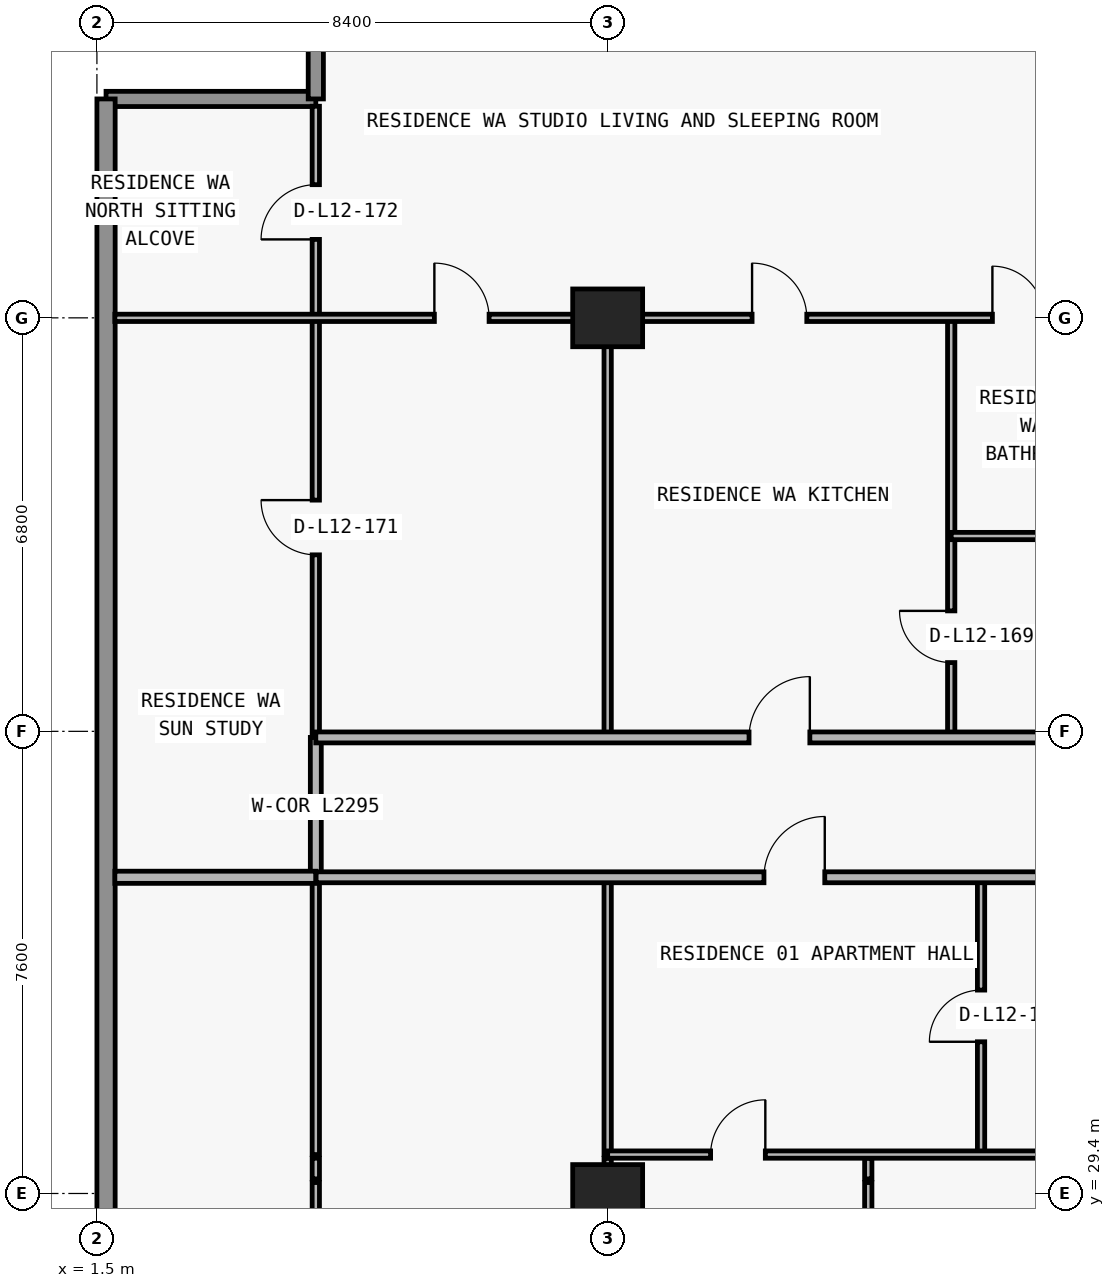
"""IFC4 building model, lengths in metres.
Left out: names, types, materials, properties, quantities, classifications, styles, units other than length and angle.
Written with IfcOpenShell. Run it as: python <this file> out.ifc"""

import sys

from ifc_helpers import new_model, si_unit, direction, frame, frame_2d, origin, origin_2d, place, context, subcontext, project, spatial, rectangle, extrude, element, fill, save


model = new_model("IFC4")
c1 = context("Model", 3, precision=1e-05, world=origin(), true_north=direction((0.0, 1.0)))
c2 = subcontext(c1, "Body", "Model", "MODEL_VIEW")
j1 = project(units=[si_unit("LENGTHUNIT", "METRE"), si_unit("PLANEANGLEUNIT", "RADIAN")], contexts=[c1])
p1 = place(None, origin())
s1 = spatial("IfcSite", under=j1, at=p1, CompositionType="ELEMENT")
p2 = place(p1, origin())
s2 = spatial("IfcBuilding", under=s1, at=p2, CompositionType="ELEMENT")
p3 = place(p2, frame((0.0, 0.0, 49.8)))
s3 = spatial("IfcBuildingStorey", under=s2, at=p3, CompositionType="ELEMENT", Elevation=49.8)
for number, where, z_axis, x_axis in (
    (1, (9.9, 29.4, 0.0), (0.0, 0.0, 1.0), (1.0, 0.0, 0.0)),
    (2, (9.9, 43.8, 0.0), (0.0, 0.0, 1.0), (1.0, 0.0, 0.0)),
):
    element("IfcColumn", number, at=place(p3, frame(where, z_axis=z_axis, x_axis=x_axis)), inside=s3, PredefinedType="COLUMN", context=c2, shape_type="SweptSolid", body=[
        extrude(rectangle(XDim=1.15, YDim=0.95, at=origin_2d()), origin(), (0.0, 0.0, 1.0), 3.05),
    ])
p4 = place(p3, frame((1.65, 47.4, 0.0), z_axis=(0.0, 0.0, 1.0), x_axis=(1.0, 0.0, 0.0)))
e3 = element("IfcWall", 3, at=p4, inside=s3, PredefinedType="ELEMENTEDWALL", context=c2, shape_type="SweptSolid", body=[
    extrude(rectangle(XDim=3.45, YDim=0.25, at=frame_2d((1.725, 0.0))), origin(), (0.0, 0.0, 1.0), 3.05),
])
p5 = place(p3, frame((5.1, 47.4, 0.0), z_axis=(0.0, 0.0, 1.0), x_axis=(0.0, 1.0, 0.0)))
e4 = element("IfcWall", 4, at=p5, inside=s3, PredefinedType="ELEMENTEDWALL", context=c2, shape_type="SweptSolid", body=[
    extrude(rectangle(XDim=3.05, YDim=0.25, at=frame_2d((1.525, 0.0))), origin(), (0.0, 0.0, 1.0), 3.05),
])
p6 = place(p3, frame((1.65, 26.8, 0.0), z_axis=(0.0, 0.0, 1.0), x_axis=(0.0, 1.0, 0.0)))
e5 = element("IfcWall", 5, at=p6, inside=s3, PredefinedType="STANDARD", context=c2, shape_type="SweptSolid", body=[
    extrude(rectangle(XDim=20.6, YDim=0.3, at=frame_2d((10.3, 0.0))), origin(), (0.0, 0.0, 1.0), 3.05),
])
p7 = place(p3, frame((5.1, 24.89, 0.0), z_axis=(0.0, 0.0, 1.0), x_axis=(0.0, 1.0, 0.0)))
e6 = element("IfcWall", 6, at=p7, inside=s3, PredefinedType="PARTITIONING", context=c2, shape_type="SweptSolid", body=[
    extrude(rectangle(XDim=4.69, YDim=0.12, at=frame_2d((2.345, 0.0))), origin(), (0.0, 0.0, 1.0), 3.05),
])
p8 = place(p3, frame((5.1, 29.64, 0.0), z_axis=(0.0, 0.0, 1.0), x_axis=(0.0, 1.0, 0.0)))
e7 = element("IfcWall", 7, at=p8, inside=s3, PredefinedType="PARTITIONING", context=c2, shape_type="SweptSolid", body=[
    extrude(rectangle(XDim=0.34, YDim=0.12, at=frame_2d((0.17, 0.0))), origin(), (0.0, 0.0, 1.0), 3.05),
])
p9 = place(p3, frame((5.1, 30.04, 0.0), z_axis=(0.0, 0.0, 1.0), x_axis=(0.0, 1.0, 0.0)))
e8 = element("IfcWall", 8, at=p9, inside=s3, PredefinedType="PARTITIONING", context=c2, shape_type="SweptSolid", body=[
    extrude(rectangle(XDim=4.56, YDim=0.12, at=frame_2d((2.28, 0.0))), origin(), (0.0, 0.0, 1.0), 3.05),
])
p10 = place(p3, frame((5.1, 34.605, 0.0), z_axis=(0.0, 0.0, 1.0), x_axis=(0.0, 1.0, 0.0)))
e9 = element("IfcWall", 9, at=p10, inside=s3, PredefinedType="PARTITIONING", context=c2, shape_type="SweptSolid", body=[
    extrude(rectangle(XDim=2.295, YDim=0.18, at=frame_2d((1.147, 0.0))), origin(), (0.0, 0.0, 1.0), 3.05),
])
p11 = place(p3, frame((5.1, 36.905, 0.0), z_axis=(0.0, 0.0, 1.0), x_axis=(0.0, 1.0, 0.0)))
e10 = element("IfcWall", 10, at=p11, inside=s3, PredefinedType="PARTITIONING", context=c2, shape_type="SweptSolid", body=[
    extrude(rectangle(XDim=10.375, YDim=0.12, at=frame_2d((5.188, 0.0))), origin(), (0.0, 0.0, 1.0), 3.05),
])
p12 = place(p11, frame((2.998, 0.0, 0.0)))
e11 = element("IfcOpeningElement", 11, at=p12, cuts=e10, PredefinedType="OPENING", context=c2, shape_type="SweptSolid", body=[
    extrude(rectangle(XDim=0.9, YDim=2.15, at=frame_2d((0.45, 1.075))), frame((0.0, 0.07, 0.0), z_axis=(0.0, -1.0, 0.0), x_axis=(1.0, 0.0, 0.0)), (0.0, 0.0, 1.0), 0.14),
])
p13 = place(p11, frame((8.185, 0.0, 0.0)))
e12 = element("IfcOpeningElement", 12, at=p13, cuts=e10, PredefinedType="OPENING", context=c2, shape_type="SweptSolid", body=[
    extrude(rectangle(XDim=0.9, YDim=2.15, at=frame_2d((0.45, 1.075))), frame((0.0, 0.07, 0.0), z_axis=(0.0, -1.0, 0.0), x_axis=(1.0, 0.0, 0.0)), (0.0, 0.0, 1.0), 0.14),
])
p14 = place(p3, frame((9.9, 24.89, 0.0), z_axis=(0.0, 0.0, 1.0), x_axis=(0.0, 1.0, 0.0)))
e13 = element("IfcWall", 13, at=p14, inside=s3, PredefinedType="PARTITIONING", context=c2, shape_type="SweptSolid", body=[
    extrude(rectangle(XDim=4.69, YDim=0.12, at=frame_2d((2.345, 0.0))), origin(), (0.0, 0.0, 1.0), 2.11),
])
p15 = place(p14, frame((1.895, 0.0, 0.0)))
e14 = element("IfcOpeningElement", 14, at=p15, cuts=e13, PredefinedType="OPENING", context=c2, shape_type="SweptSolid", body=[
    extrude(rectangle(XDim=0.9, YDim=2.06, at=frame_2d((0.45, 1.03))), frame((0.0, 0.07, 0.0), z_axis=(0.0, -1.0, 0.0), x_axis=(1.0, 0.0, 0.0)), (0.0, 0.0, 1.0), 0.14),
])
p16 = place(p3, frame((9.9, 29.64, 0.0), z_axis=(0.0, 0.0, 1.0), x_axis=(0.0, 1.0, 0.0)))
e15 = element("IfcWall", 15, at=p16, inside=s3, PredefinedType="PARTITIONING", context=c2, shape_type="SweptSolid", body=[
    extrude(rectangle(XDim=0.34, YDim=0.12, at=frame_2d((0.17, 0.0))), origin(), (0.0, 0.0, 1.0), 2.11),
])
p17 = place(p3, frame((9.9, 30.04, 0.0), z_axis=(0.0, 0.0, 1.0), x_axis=(0.0, 1.0, 0.0)))
e16 = element("IfcWall", 16, at=p17, inside=s3, PredefinedType="PARTITIONING", context=c2, shape_type="SweptSolid", body=[
    extrude(rectangle(XDim=4.56, YDim=0.12, at=frame_2d((2.28, 0.0))), origin(), (0.0, 0.0, 1.0), 2.11),
])
p18 = place(p3, frame((9.9, 36.9, 0.0), z_axis=(0.0, 0.0, 1.0), x_axis=(0.0, 1.0, 0.0)))
e17 = element("IfcWall", 17, at=p18, inside=s3, PredefinedType="PARTITIONING", context=c2, shape_type="SweptSolid", body=[
    extrude(rectangle(XDim=6.9, YDim=0.12, at=frame_2d((3.45, 0.0))), origin(), (0.0, 0.0, 1.0), 2.11),
])
p19 = place(p3, frame((14.186, 24.89, 0.0), z_axis=(0.0, 0.0, 1.0), x_axis=(0.0, 1.0, 0.0)))
e18 = element("IfcWall", 18, at=p19, inside=s3, PredefinedType="PARTITIONING", context=c2, shape_type="SweptSolid", body=[
    extrude(rectangle(XDim=4.69, YDim=0.12, at=frame_2d((2.345, 0.0))), origin(), (0.0, 0.0, 1.0), 3.05),
])
p20 = place(p19, frame((1.895, 0.0, 0.0)))
e19 = element("IfcOpeningElement", 19, at=p20, cuts=e18, PredefinedType="OPENING", context=c2, shape_type="SweptSolid", body=[
    extrude(rectangle(XDim=0.9, YDim=2.15, at=frame_2d((0.45, 1.075))), frame((0.0, 0.07, 0.0), z_axis=(0.0, -1.0, 0.0), x_axis=(1.0, 0.0, 0.0)), (0.0, 0.0, 1.0), 0.14),
])
p21 = place(p3, frame((14.186, 29.64, 0.0), z_axis=(0.0, 0.0, 1.0), x_axis=(0.0, 1.0, 0.0)))
e20 = element("IfcWall", 20, at=p21, inside=s3, PredefinedType="PARTITIONING", context=c2, shape_type="SweptSolid", body=[
    extrude(rectangle(XDim=0.34, YDim=0.12, at=frame_2d((0.17, 0.0))), origin(), (0.0, 0.0, 1.0), 3.05),
])
p22 = place(p3, frame((15.55, 36.9, 0.0), z_axis=(0.0, 0.0, 1.0), x_axis=(0.0, 1.0, 0.0)))
e21 = element("IfcWall", 21, at=p22, inside=s3, PredefinedType="PARTITIONING", context=c2, shape_type="SweptSolid", body=[
    extrude(rectangle(XDim=6.9, YDim=0.12, at=frame_2d((3.45, 0.0))), origin(), (0.0, 0.0, 1.0), 2.499),
])
p23 = place(p22, frame((1.231, 0.0, 0.0)))
e22 = element("IfcOpeningElement", 22, at=p23, cuts=e21, PredefinedType="OPENING", context=c2, shape_type="SweptSolid", body=[
    extrude(rectangle(XDim=0.85, YDim=2.1, at=frame_2d((0.425, 1.05))), frame((0.0, 0.07, 0.0), z_axis=(0.0, -1.0, 0.0), x_axis=(1.0, 0.0, 0.0)), (0.0, 0.0, 1.0), 0.14),
])
p24 = place(p3, frame((16.041, 30.04, 0.0), z_axis=(0.0, 0.0, 1.0), x_axis=(0.0, 1.0, 0.0)))
e23 = element("IfcWall", 23, at=p24, inside=s3, PredefinedType="PARTITIONING", context=c2, shape_type="SweptSolid", body=[
    extrude(rectangle(XDim=4.56, YDim=0.12, at=frame_2d((2.28, 0.0))), origin(), (0.0, 0.0, 1.0), 3.05),
])
p25 = place(p24, frame((1.855, 0.0, 0.0)))
e24 = element("IfcOpeningElement", 24, at=p25, cuts=e23, PredefinedType="OPENING", context=c2, shape_type="SweptSolid", body=[
    extrude(rectangle(XDim=0.85, YDim=2.1, at=frame_2d((0.425, 1.05))), frame((0.0, 0.07, 0.0), z_axis=(0.0, -1.0, 0.0), x_axis=(1.0, 0.0, 0.0)), (0.0, 0.0, 1.0), 0.14),
])
p26 = place(p3, frame((9.9, 30.04, 0.0), z_axis=(0.0, 0.0, 1.0), x_axis=(1.0, 0.0, 0.0)))
e25 = element("IfcWall", 25, at=p26, inside=s3, PredefinedType="PARTITIONING", context=c2, shape_type="SweptSolid", body=[
    extrude(rectangle(XDim=8.4, YDim=0.12, at=frame_2d((4.2, 0.0))), origin(), (0.0, 0.0, 1.0), 3.05),
])
p27 = place(p26, frame((1.693, 0.0, 0.0)))
e26 = element("IfcOpeningElement", 26, at=p27, cuts=e25, PredefinedType="OPENING", context=c2, shape_type="SweptSolid", body=[
    extrude(rectangle(XDim=0.9, YDim=2.15, at=frame_2d((0.45, 1.075))), frame((0.0, 0.07, 0.0), z_axis=(0.0, -1.0, 0.0), x_axis=(1.0, 0.0, 0.0)), (0.0, 0.0, 1.0), 0.14),
])
p28 = place(p3, frame((1.795, 34.6, 0.0), z_axis=(0.0, 0.0, 1.0), x_axis=(1.0, 0.0, 0.0)))
e27 = element("IfcWall", 27, at=p28, inside=s3, PredefinedType="PARTITIONING", context=c2, shape_type="SweptSolid", body=[
    extrude(rectangle(XDim=3.305, YDim=0.2, at=frame_2d((1.653, 0.0))), origin(), (0.0, 0.0, 1.0), 3.05),
])
p29 = place(p3, frame((5.105, 34.6, 0.0), z_axis=(0.0, 0.0, 1.0), x_axis=(1.0, 0.0, 0.0)))
e28 = element("IfcWall", 28, at=p29, inside=s3, PredefinedType="PARTITIONING", context=c2, shape_type="SweptSolid", body=[
    extrude(rectangle(XDim=67.595, YDim=0.18, at=frame_2d((33.797, 0.0))), origin(), (0.0, 0.0, 1.0), 3.05),
])
p30 = place(p29, frame((7.365, 0.0, 0.0)))
e29 = element("IfcOpeningElement", 29, at=p30, cuts=e28, PredefinedType="OPENING", context=c2, shape_type="SweptSolid", body=[
    extrude(rectangle(XDim=1.0, YDim=2.2, at=frame_2d((0.5, 1.1))), frame((0.0, 0.1, 0.0), z_axis=(0.0, -1.0, 0.0), x_axis=(1.0, 0.0, 0.0)), (0.0, 0.0, 1.0), 0.2),
])
p31 = place(p29, frame((15.927, 0.0, 0.0)))
e30 = element("IfcOpeningElement", 30, at=p31, cuts=e28, PredefinedType="OPENING", context=c2, shape_type="SweptSolid", body=[
    extrude(rectangle(XDim=1.0, YDim=2.2, at=frame_2d((0.5, 1.1))), frame((0.0, 0.1, 0.0), z_axis=(0.0, -1.0, 0.0), x_axis=(1.0, 0.0, 0.0)), (0.0, 0.0, 1.0), 0.2),
])
p32 = place(p29, frame((24.407, 0.0, 0.0)))
e31 = element("IfcOpeningElement", 31, at=p32, cuts=e28, PredefinedType="OPENING", context=c2, shape_type="SweptSolid", body=[
    extrude(rectangle(XDim=1.0, YDim=2.2, at=frame_2d((0.5, 1.1))), frame((0.0, 0.1, 0.0), z_axis=(0.0, -1.0, 0.0), x_axis=(1.0, 0.0, 0.0)), (0.0, 0.0, 1.0), 0.2),
])
p33 = place(p29, frame((48.739, 0.0, 0.0)))
e32 = element("IfcOpeningElement", 32, at=p33, cuts=e28, PredefinedType="OPENING", context=c2, shape_type="SweptSolid", body=[
    extrude(rectangle(XDim=1.0, YDim=2.2, at=frame_2d((0.5, 1.1))), frame((0.0, 0.1, 0.0), z_axis=(0.0, -1.0, 0.0), x_axis=(1.0, 0.0, 0.0)), (0.0, 0.0, 1.0), 0.2),
])
p34 = place(p29, frame((56.98, 0.0, 0.0)))
e33 = element("IfcOpeningElement", 33, at=p34, cuts=e28, PredefinedType="OPENING", context=c2, shape_type="SweptSolid", body=[
    extrude(rectangle(XDim=1.0, YDim=2.2, at=frame_2d((0.5, 1.1))), frame((0.0, 0.1, 0.0), z_axis=(0.0, -1.0, 0.0), x_axis=(1.0, 0.0, 0.0)), (0.0, 0.0, 1.0), 0.2),
])
p35 = place(p3, frame((5.1, 36.9, 0.0), z_axis=(0.0, 0.0, 1.0), x_axis=(1.0, 0.0, 0.0)))
e34 = element("IfcWall", 34, at=p35, inside=s3, PredefinedType="PARTITIONING", context=c2, shape_type="SweptSolid", body=[
    extrude(rectangle(XDim=12.645, YDim=0.18, at=frame_2d((6.323, 0.0))), origin(), (0.0, 0.0, 1.0), 3.05),
])
p36 = place(p35, frame((7.125, 0.0, 0.0)))
e35 = element("IfcOpeningElement", 35, at=p36, cuts=e34, PredefinedType="OPENING", context=c2, shape_type="SweptSolid", body=[
    extrude(rectangle(XDim=1.0, YDim=2.2, at=frame_2d((0.5, 1.1))), frame((0.0, 0.1, 0.0), z_axis=(0.0, -1.0, 0.0), x_axis=(1.0, 0.0, 0.0)), (0.0, 0.0, 1.0), 0.2),
])
p37 = place(p3, frame((15.55, 40.212, 0.0), z_axis=(0.0, 0.0, 1.0), x_axis=(1.0, 0.0, 0.0)))
e36 = element("IfcWall", 36, at=p37, inside=s3, PredefinedType="PARTITIONING", context=c2, shape_type="SweptSolid", body=[
    extrude(rectangle(XDim=2.205, YDim=0.12, at=frame_2d((1.103, 0.0))), origin(), (0.0, 0.0, 1.0), 3.05),
])
p38 = place(p3, frame((1.795, 43.8, 0.0), z_axis=(0.0, 0.0, 1.0), x_axis=(1.0, 0.0, 0.0)))
e37 = element("IfcWall", 37, at=p38, inside=s3, PredefinedType="PARTITIONING", context=c2, shape_type="SweptSolid", body=[
    extrude(rectangle(XDim=15.96, YDim=0.12, at=frame_2d((7.98, 0.0))), origin(), (0.0, 0.0, 1.0), 2.339),
])
p39 = place(p38, frame((5.255, 0.0, 0.0)))
e38 = element("IfcOpeningElement", 38, at=p39, cuts=e37, PredefinedType="OPENING", context=c2, shape_type="SweptSolid", body=[
    extrude(rectangle(XDim=0.9, YDim=2.15, at=frame_2d((0.45, 1.075))), frame((0.0, 0.07, 0.0), z_axis=(0.0, -1.0, 0.0), x_axis=(1.0, 0.0, 0.0)), (0.0, 0.0, 1.0), 0.14),
])
p40 = place(p38, frame((10.48, 0.0, 0.0)))
e39 = element("IfcOpeningElement", 39, at=p40, cuts=e37, PredefinedType="OPENING", context=c2, shape_type="SweptSolid", body=[
    extrude(rectangle(XDim=0.9, YDim=2.15, at=frame_2d((0.45, 1.075))), frame((0.0, 0.07, 0.0), z_axis=(0.0, -1.0, 0.0), x_axis=(1.0, 0.0, 0.0)), (0.0, 0.0, 1.0), 0.14),
])
p41 = place(p38, frame((14.433, 0.0, 0.0)))
e40 = element("IfcOpeningElement", 40, at=p41, cuts=e37, PredefinedType="OPENING", context=c2, shape_type="SweptSolid", body=[
    extrude(rectangle(XDim=0.85, YDim=2.1, at=frame_2d((0.425, 1.05))), frame((0.0, 0.07, 0.0), z_axis=(0.0, -1.0, 0.0), x_axis=(1.0, 0.0, 0.0)), (0.0, 0.0, 1.0), 0.14),
])
p42 = place(p30, origin())
e41 = element("IfcDoor", 41, at=p42, inside=s3, OperationType="SINGLE_SWING_RIGHT", PredefinedType="DOOR", context=c2, shape_type="SweptSolid", body=[
    extrude(rectangle(XDim=1.0, YDim=2.2, at=frame_2d((0.5, 1.1))), frame((0.0, 0.025, 0.0), z_axis=(0.0, -1.0, 0.0), x_axis=(1.0, 0.0, 0.0)), (0.0, 0.0, 1.0), 0.05),
])
fill(e29, e41)
p43 = place(p25, origin())
e42 = element("IfcDoor", 42, at=p43, inside=s3, OperationType="SINGLE_SWING_LEFT", PredefinedType="DOOR", context=c2, shape_type="SweptSolid", body=[
    extrude(rectangle(XDim=0.85, YDim=2.1, at=frame_2d((0.425, 1.05))), frame((0.0, 0.025, 0.0), z_axis=(0.0, -1.0, 0.0), x_axis=(1.0, 0.0, 0.0)), (0.0, 0.0, 1.0), 0.05),
])
fill(e24, e42)
p44 = place(p27, origin())
e43 = element("IfcDoor", 43, at=p44, inside=s3, OperationType="SINGLE_SWING_RIGHT", PredefinedType="DOOR", context=c2, shape_type="SweptSolid", body=[
    extrude(rectangle(XDim=0.9, YDim=2.15, at=frame_2d((0.45, 1.075))), frame((0.0, 0.025, 0.0), z_axis=(0.0, -1.0, 0.0), x_axis=(1.0, 0.0, 0.0)), (0.0, 0.0, 1.0), 0.05),
])
fill(e26, e43)
p45 = place(p39, origin())
e44 = element("IfcDoor", 44, at=p45, inside=s3, OperationType="SINGLE_SWING_LEFT", PredefinedType="DOOR", context=c2, shape_type="SweptSolid", body=[
    extrude(rectangle(XDim=0.9, YDim=2.15, at=frame_2d((0.45, 1.075))), frame((0.0, 0.025, 0.0), z_axis=(0.0, -1.0, 0.0), x_axis=(1.0, 0.0, 0.0)), (0.0, 0.0, 1.0), 0.05),
])
fill(e38, e44)
p46 = place(p36, origin())
e45 = element("IfcDoor", 45, at=p46, inside=s3, OperationType="SINGLE_SWING_RIGHT", PredefinedType="DOOR", context=c2, shape_type="SweptSolid", body=[
    extrude(rectangle(XDim=1.0, YDim=2.2, at=frame_2d((0.5, 1.1))), frame((0.0, 0.025, 0.0), z_axis=(0.0, -1.0, 0.0), x_axis=(1.0, 0.0, 0.0)), (0.0, 0.0, 1.0), 0.05),
])
fill(e35, e45)
p47 = place(p40, origin())
e46 = element("IfcDoor", 46, at=p47, inside=s3, OperationType="SINGLE_SWING_LEFT", PredefinedType="DOOR", context=c2, shape_type="SweptSolid", body=[
    extrude(rectangle(XDim=0.9, YDim=2.15, at=frame_2d((0.45, 1.075))), frame((0.0, 0.025, 0.0), z_axis=(0.0, -1.0, 0.0), x_axis=(1.0, 0.0, 0.0)), (0.0, 0.0, 1.0), 0.05),
])
fill(e39, e46)
p48 = place(p23, origin())
e47 = element("IfcDoor", 47, at=p48, inside=s3, OperationType="SINGLE_SWING_RIGHT", PredefinedType="DOOR", context=c2, shape_type="SweptSolid", body=[
    extrude(rectangle(XDim=0.85, YDim=2.1, at=frame_2d((0.425, 1.05))), frame((0.0, 0.025, 0.0), z_axis=(0.0, -1.0, 0.0), x_axis=(1.0, 0.0, 0.0)), (0.0, 0.0, 1.0), 0.05),
])
fill(e22, e47)
p49 = place(p41, origin())
e48 = element("IfcDoor", 48, at=p49, inside=s3, OperationType="SINGLE_SWING_LEFT", PredefinedType="DOOR", context=c2, shape_type="SweptSolid", body=[
    extrude(rectangle(XDim=0.85, YDim=2.1, at=frame_2d((0.425, 1.05))), frame((0.0, 0.025, 0.0), z_axis=(0.0, -1.0, 0.0), x_axis=(1.0, 0.0, 0.0)), (0.0, 0.0, 1.0), 0.05),
])
fill(e40, e48)
p50 = place(p12, origin())
e49 = element("IfcDoor", 49, at=p50, inside=s3, OperationType="SINGLE_SWING_RIGHT", PredefinedType="DOOR", context=c2, shape_type="SweptSolid", body=[
    extrude(rectangle(XDim=0.9, YDim=2.15, at=frame_2d((0.45, 1.075))), frame((0.0, 0.025, 0.0), z_axis=(0.0, -1.0, 0.0), x_axis=(1.0, 0.0, 0.0)), (0.0, 0.0, 1.0), 0.05),
])
fill(e11, e49)
p51 = place(p13, origin())
e50 = element("IfcDoor", 50, at=p51, inside=s3, OperationType="SINGLE_SWING_LEFT", PredefinedType="DOOR", context=c2, shape_type="SweptSolid", body=[
    extrude(rectangle(XDim=0.9, YDim=2.15, at=frame_2d((0.45, 1.075))), frame((0.0, 0.025, 0.0), z_axis=(0.0, -1.0, 0.0), x_axis=(1.0, 0.0, 0.0)), (0.0, 0.0, 1.0), 0.05),
])
fill(e12, e50)
save(model, sys.argv[1])
